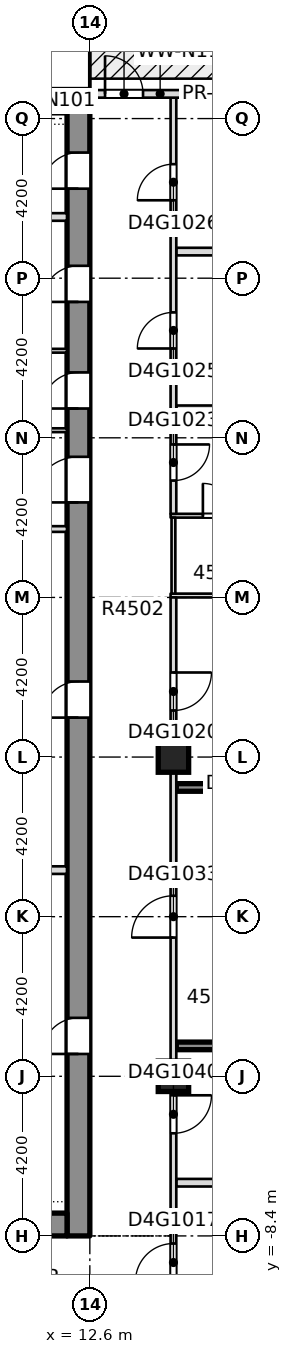
"""IFC4 building model, lengths in metres.
Left out: names, types, materials, properties, quantities, classifications, styles, units other than length and angle.
Written with IfcOpenShell. Run it as: python <this file> out.ifc"""

import sys

from ifc_helpers import new_model, si_unit, direction, frame, frame_2d, origin, origin_2d, place, context, subcontext, project, spatial, rectangle, extrude, element, fill, save


model = new_model("IFC4")
c1 = context("Model", 3, precision=1e-05, world=origin(), true_north=direction((0.0, 1.0)))
c2 = subcontext(c1, "Body", "Model", "MODEL_VIEW")
j1 = project(units=[si_unit("LENGTHUNIT", "METRE"), si_unit("PLANEANGLEUNIT", "RADIAN")], contexts=[c1])
p1 = place(None, origin())
s1 = spatial("IfcSite", under=j1, at=p1, CompositionType="ELEMENT")
p2 = place(p1, origin())
s2 = spatial("IfcBuilding", under=s1, at=p2, CompositionType="ELEMENT")
p3 = place(p2, frame((0.0, 0.0, 175.55)))
s3 = spatial("IfcBuildingStorey", under=s2, at=p3, CompositionType="ELEMENT", Elevation=175.55)
p4 = place(p3, frame((12.3, -8.4, -0.4), z_axis=(0.0, 0.0, 1.0), x_axis=(0.0, 1.0, 0.0)))
e1 = element("IfcWall", 1, at=p4, inside=s3, PredefinedType="SHEAR", context=c2, shape_type="SweptSolid", body=[
    extrude(rectangle(XDim=30.15, YDim=0.6, at=frame_2d((15.075, 0.0))), origin(), (0.0, 0.0, 1.0), 3.45),
])
p5 = place(p4, frame((4.788, 0.0, 0.4)))
e2 = element("IfcOpeningElement", 2, at=p5, cuts=e1, PredefinedType="OPENING", context=c2, shape_type="SweptSolid", body=[
    extrude(rectangle(XDim=0.95, YDim=2.1, at=frame_2d((0.475, 1.05))), frame((0.0, 0.31, 0.0), z_axis=(0.0, -1.0, 0.0), x_axis=(1.0, 0.0, 0.0)), (0.0, 0.0, 1.0), 0.62),
])
p6 = place(p4, frame((13.638, 0.0, 0.4)))
e3 = element("IfcOpeningElement", 3, at=p6, cuts=e1, PredefinedType="OPENING", context=c2, shape_type="SweptSolid", body=[
    extrude(rectangle(XDim=0.95, YDim=2.1, at=frame_2d((0.475, 1.05))), frame((0.0, 0.31, 0.0), z_axis=(0.0, -1.0, 0.0), x_axis=(1.0, 0.0, 0.0)), (0.0, 0.0, 1.0), 0.62),
])
p7 = place(p4, frame((21.771, 0.0, 0.4)))
e4 = element("IfcOpeningElement", 4, at=p7, cuts=e1, PredefinedType="OPENING", context=c2, shape_type="SweptSolid", body=[
    extrude(rectangle(XDim=0.95, YDim=2.1, at=frame_2d((0.475, 1.05))), frame((0.0, 0.31, 0.0), z_axis=(0.0, -1.0, 0.0), x_axis=(1.0, 0.0, 0.0)), (0.0, 0.0, 1.0), 0.62),
])
p8 = place(p4, frame((24.576, 0.0, 0.4)))
e5 = element("IfcOpeningElement", 5, at=p8, cuts=e1, PredefinedType="OPENING", context=c2, shape_type="SweptSolid", body=[
    extrude(rectangle(XDim=0.95, YDim=2.1, at=frame_2d((0.475, 1.05))), frame((0.0, 0.31, 0.0), z_axis=(0.0, -1.0, 0.0), x_axis=(1.0, 0.0, 0.0)), (0.0, 0.0, 1.0), 0.62),
])
p9 = place(p4, frame((27.555, 0.0, 0.4)))
e6 = element("IfcOpeningElement", 6, at=p9, cuts=e1, PredefinedType="OPENING", context=c2, shape_type="SweptSolid", body=[
    extrude(rectangle(XDim=0.95, YDim=2.1, at=frame_2d((0.475, 1.05))), frame((0.0, 0.31, 0.0), z_axis=(0.0, -1.0, 0.0), x_axis=(1.0, 0.0, 0.0)), (0.0, 0.0, 1.0), 0.62),
])
p10 = place(p4, frame((19.3, 0.0, 0.4)))
e7 = element("IfcOpeningElement", 7, at=p10, cuts=e1, PredefinedType="OPENING", context=c2, shape_type="SweptSolid", body=[
    extrude(rectangle(XDim=1.2, YDim=2.1, at=frame_2d((0.6, 1.05))), frame((0.0, 0.31, 0.0), z_axis=(0.0, -1.0, 0.0), x_axis=(1.0, 0.0, 0.0)), (0.0, 0.0, 1.0), 0.62),
])
p11 = place(p3, frame((-12.0, -8.1, -0.4), z_axis=(0.0, 0.0, 1.0), x_axis=(1.0, 0.0, 0.0)))
e8 = element("IfcWall", 8, at=p11, inside=s3, PredefinedType="SHEAR", context=c2, shape_type="SweptSolid", body=[
    extrude(rectangle(XDim=24.0, YDim=0.6, at=frame_2d((12.0, 0.0))), origin(), (0.0, 0.0, 1.0), 3.45),
])
p12 = place(p11, frame((7.25, 0.0, 0.4)))
e9 = element("IfcOpeningElement", 9, at=p12, cuts=e8, PredefinedType="OPENING", context=c2, shape_type="SweptSolid", body=[
    extrude(rectangle(XDim=1.8, YDim=2.1, at=frame_2d((0.9, 1.05))), frame((0.0, 0.31, 0.0), z_axis=(0.0, -1.0, 0.0), x_axis=(1.0, 0.0, 0.0)), (0.0, 0.0, 1.0), 0.62),
])
p13 = place(p11, frame((14.95, 0.0, 0.4)))
e10 = element("IfcOpeningElement", 10, at=p13, cuts=e8, PredefinedType="OPENING", context=c2, shape_type="SweptSolid", body=[
    extrude(rectangle(XDim=1.8, YDim=2.1, at=frame_2d((0.9, 1.05))), frame((0.0, 0.31, 0.0), z_axis=(0.0, -1.0, 0.0), x_axis=(1.0, 0.0, 0.0)), (0.0, 0.0, 1.0), 0.62),
])
p14 = place(p3, frame((-12.0, 21.45, -0.4), z_axis=(0.0, 0.0, 1.0), x_axis=(1.0, 0.0, 0.0)))
e11 = element("IfcWall", 11, at=p14, inside=s3, PredefinedType="SHEAR", context=c2, shape_type="SweptSolid", body=[
    extrude(rectangle(XDim=24.0, YDim=0.6, at=frame_2d((12.0, 0.0))), origin(), (0.0, 0.0, 1.0), 3.45),
])
for number, where, z_axis, x_axis in (
    (12, (14.8, -4.2, -0.4), (0.0, 0.0, 1.0), (1.0, 0.0, 0.0)),
    (13, (14.8, 4.2, -0.4), (0.0, 0.0, 1.0), (1.0, 0.0, 0.0)),
):
    element("IfcColumn", number, at=place(p3, frame(where, z_axis=z_axis, x_axis=x_axis)), inside=s3, PredefinedType="COLUMN", context=c2, shape_type="SweptSolid", body=[
        extrude(rectangle(XDim=0.8, YDim=0.8, at=origin_2d()), origin(), (0.0, 0.0, 1.0), 3.45),
    ])
p15 = place(p3, frame((14.875, -7.0, 0.0), z_axis=(0.0, 0.0, 1.0), x_axis=(1.0, 0.0, 0.0)))
e14 = element("IfcWall", 14, at=p15, inside=s3, PredefinedType="PARTITIONING", context=c2, shape_type="SweptSolid", body=[
    extrude(rectangle(XDim=10.875, YDim=0.2, at=frame_2d((5.438, 0.0))), origin(), (0.0, 0.0, 1.0), 3.05),
])
p16 = place(p3, frame((14.875, -3.4, 0.0), z_axis=(0.0, 0.0, 1.0), x_axis=(1.0, 0.0, 0.0)))
e15 = element("IfcWall", 15, at=p16, inside=s3, PredefinedType="SOLIDWALL", context=c2, shape_type="SweptSolid", body=[
    extrude(rectangle(XDim=7.525, YDim=0.2, at=frame_2d((3.762, 0.0))), origin(), (0.0, 0.0, 1.0), 3.05),
])
p17 = place(p3, frame((14.875, 3.4, 0.0), z_axis=(0.0, 0.0, 1.0), x_axis=(1.0, 0.0, 0.0)))
e16 = element("IfcWall", 16, at=p17, inside=s3, PredefinedType="SOLIDWALL", context=c2, shape_type="SweptSolid", body=[
    extrude(rectangle(XDim=5.575, YDim=0.2, at=frame_2d((2.788, 0.0))), origin(), (0.0, 0.0, 1.0), 3.05),
])
p18 = place(p3, frame((14.725, 8.45, 0.0), z_axis=(0.0, 0.0, 1.0), x_axis=(1.0, 0.0, 0.0)))
e17 = element("IfcWall", 17, at=p18, inside=s3, PredefinedType="PARTITIONING", context=c2, shape_type="SweptSolid", body=[
    extrude(rectangle(XDim=2.525, YDim=0.1, at=frame_2d((1.262, 0.0))), origin(), (0.0, 0.0, 1.0), 3.05),
])
p19 = place(p3, frame((14.725, 10.55, 0.0), z_axis=(0.0, 0.0, 1.0), x_axis=(1.0, 0.0, 0.0)))
e18 = element("IfcWall", 18, at=p19, inside=s3, PredefinedType="PARTITIONING", context=c2, shape_type="SweptSolid", body=[
    extrude(rectangle(XDim=2.525, YDim=0.1, at=frame_2d((1.262, 0.0))), origin(), (0.0, 0.0, 1.0), 3.05),
])
p20 = place(p19, frame((0.85, 0.0, 0.0)))
e19 = element("IfcOpeningElement", 19, at=p20, cuts=e18, PredefinedType="OPENING", context=c2, shape_type="SweptSolid", body=[
    extrude(rectangle(XDim=0.85, YDim=2.1, at=frame_2d((0.425, 1.05))), frame((0.0, 0.06, 0.0), z_axis=(0.0, -1.0, 0.0), x_axis=(1.0, 0.0, 0.0)), (0.0, 0.0, 1.0), 0.12),
])
for number, where, z_axis, x_axis in (
    (20, (14.875, 13.35, 0.0), (0.0, 0.0, 1.0), (1.0, 0.0, 0.0)),
    (21, (14.875, 17.5, 0.0), (0.0, 0.0, 1.0), (1.0, 0.0, 0.0)),
):
    element("IfcWall", number, at=place(p3, frame(where, z_axis=z_axis, x_axis=x_axis)), inside=s3, PredefinedType="PARTITIONING", context=c2, shape_type="SweptSolid", body=[
        extrude(rectangle(XDim=2.475, YDim=0.2, at=frame_2d((1.238, 0.0))), origin(), (0.0, 0.0, 1.0), 3.05),
    ])
p21 = place(p3, frame((14.8, -10.525, 0.0), z_axis=(0.0, 0.0, 1.0), x_axis=(0.0, 1.0, 0.0)))
e22 = element("IfcWall", 22, at=p21, inside=s3, PredefinedType="PARTITIONING", context=c2, shape_type="SweptSolid", body=[
    extrude(rectangle(XDim=18.925, YDim=0.15, at=frame_2d((9.462, 0.0))), origin(), (0.0, 0.0, 1.0), 3.05),
])
p22 = place(p21, frame((0.925, 0.0, 0.0)))
e23 = element("IfcOpeningElement", 23, at=p22, cuts=e22, PredefinedType="OPENING", context=c2, shape_type="SweptSolid", body=[
    extrude(rectangle(XDim=1.0, YDim=2.1, at=frame_2d((0.5, 1.05))), frame((0.0, 0.085, 0.0), z_axis=(0.0, -1.0, 0.0), x_axis=(1.0, 0.0, 0.0)), (0.0, 0.0, 1.0), 0.17),
])
p23 = place(p21, frame((15.95, 0.0, 0.0)))
e24 = element("IfcOpeningElement", 24, at=p23, cuts=e22, PredefinedType="OPENING", context=c2, shape_type="SweptSolid", body=[
    extrude(rectangle(XDim=1.0, YDim=2.1, at=frame_2d((0.5, 1.05))), frame((0.0, 0.085, 0.0), z_axis=(0.0, -1.0, 0.0), x_axis=(1.0, 0.0, 0.0)), (0.0, 0.0, 1.0), 0.17),
])
p24 = place(p21, frame((9.975, 0.0, 0.0)))
e25 = element("IfcOpeningElement", 25, at=p24, cuts=e22, PredefinedType="OPENING", context=c2, shape_type="SweptSolid", body=[
    extrude(rectangle(XDim=1.1, YDim=2.1, at=frame_2d((0.55, 1.05))), frame((0.0, 0.085, 0.0), z_axis=(0.0, -1.0, 0.0), x_axis=(1.0, 0.0, 0.0)), (0.0, 0.0, 1.0), 0.17),
])
p25 = place(p21, frame((4.825, 0.0, 0.0)))
e26 = element("IfcOpeningElement", 26, at=p25, cuts=e22, PredefinedType="OPENING", context=c2, shape_type="SweptSolid", body=[
    extrude(rectangle(XDim=1.0, YDim=2.1, at=frame_2d((0.5, 1.05))), frame((0.0, 0.085, 0.0), z_axis=(0.0, -1.0, 0.0), x_axis=(1.0, 0.0, 0.0)), (0.0, 0.0, 1.0), 0.17),
])
p26 = place(p3, frame((14.8, 8.5, 0.0), z_axis=(0.0, 0.0, 1.0), x_axis=(0.0, 1.0, 0.0)))
e27 = element("IfcWall", 27, at=p26, inside=s3, PredefinedType="PARTITIONING", context=c2, shape_type="SweptSolid", body=[
    extrude(rectangle(XDim=2.0, YDim=0.1, at=frame_2d((1.0, 0.0))), origin(), (0.0, 0.0, 1.0), 3.05),
])
p27 = place(p3, frame((14.8, 10.6, 0.0), z_axis=(0.0, 0.0, 1.0), x_axis=(0.0, 1.0, 0.0)))
e28 = element("IfcWall", 28, at=p27, inside=s3, PredefinedType="PARTITIONING", context=c2, shape_type="SweptSolid", body=[
    extrude(rectangle(XDim=10.95, YDim=0.15, at=frame_2d((5.475, 0.0))), origin(), (0.0, 0.0, 1.0), 3.05),
])
p28 = place(p27, frame((0.875, 0.0, 0.0)))
e29 = element("IfcOpeningElement", 29, at=p28, cuts=e28, PredefinedType="OPENING", context=c2, shape_type="SweptSolid", body=[
    extrude(rectangle(XDim=0.95, YDim=2.1, at=frame_2d((0.475, 1.05))), frame((0.0, 0.085, 0.0), z_axis=(0.0, -1.0, 0.0), x_axis=(1.0, 0.0, 0.0)), (0.0, 0.0, 1.0), 0.17),
])
p29 = place(p27, frame((4.35, 0.0, 0.0)))
e30 = element("IfcOpeningElement", 30, at=p29, cuts=e28, PredefinedType="OPENING", context=c2, shape_type="SweptSolid", body=[
    extrude(rectangle(XDim=0.95, YDim=2.1, at=frame_2d((0.475, 1.05))), frame((0.0, 0.085, 0.0), z_axis=(0.0, -1.0, 0.0), x_axis=(1.0, 0.0, 0.0)), (0.0, 0.0, 1.0), 0.17),
])
p30 = place(p27, frame((8.25, 0.0, 0.0)))
e31 = element("IfcOpeningElement", 31, at=p30, cuts=e28, PredefinedType="OPENING", context=c2, shape_type="SweptSolid", body=[
    extrude(rectangle(XDim=0.95, YDim=2.1, at=frame_2d((0.475, 1.05))), frame((0.0, 0.085, 0.0), z_axis=(0.0, -1.0, 0.0), x_axis=(1.0, 0.0, 0.0)), (0.0, 0.0, 1.0), 0.17),
])
p31 = place(p3, frame((16.3, 21.65, 0.0), z_axis=(0.0, 0.0, 1.0), x_axis=(-1.0, 0.0, 0.0)))
e32 = element("IfcWall", 32, at=p31, inside=s3, PredefinedType="STANDARD", context=c2, shape_type="SweptSolid", body=[
    extrude(rectangle(XDim=3.7, YDim=0.2, at=frame_2d((1.85, 0.0))), origin(), (0.0, 0.0, 1.0), 3.05),
])
p32 = place(p31, frame((2.3, 0.0, 0.0)))
e33 = element("IfcOpeningElement", 33, at=p32, cuts=e32, PredefinedType="OPENING", context=c2, shape_type="SweptSolid", body=[
    extrude(rectangle(XDim=1.0, YDim=2.4, at=frame_2d((0.5, 1.2))), frame((0.0, 0.11, 0.0), z_axis=(0.0, -1.0, 0.0), x_axis=(1.0, 0.0, 0.0)), (0.0, 0.0, 1.0), 0.22),
])
p33 = place(p3, frame((17.49, 22.954, -0.04), z_axis=(0.0, 0.0, 1.0), x_axis=(-1.0, 0.0, 0.0)))
e34 = element("IfcWall", 34, at=p33, inside=s3, PredefinedType="USERDEFINED", context=c2, shape_type="SweptSolid", body=[
    extrude(rectangle(XDim=2.89, YDim=0.6, at=frame_2d((1.445, 0.0))), origin(), (0.0, 0.0, 1.0), 1.2),
])
p34 = place(p3, frame((8.701, 1.225, 0.0), z_axis=(0.0, 0.0, 1.0), x_axis=(1.0, 0.0, 0.0)))
e35 = element("IfcWall", 35, at=p34, inside=s3, PredefinedType="PARTITIONING", context=c2, shape_type="SweptSolid", body=[
    extrude(rectangle(XDim=3.298, YDim=0.2, at=frame_2d((1.649, 0.0))), origin(), (0.0, 0.0, 1.0), 3.05),
])
p35 = place(p3, frame((8.701, 10.2, 0.0), z_axis=(0.0, 0.0, 1.0), x_axis=(1.0, 0.0, 0.0)))
e36 = element("IfcWall", 36, at=p35, inside=s3, PredefinedType="PARTITIONING", context=c2, shape_type="SweptSolid", body=[
    extrude(rectangle(XDim=3.298, YDim=0.15, at=frame_2d((1.649, 0.0))), origin(), (0.0, 0.0, 1.0), 3.05),
])
for number, where, z_axis, x_axis in (
    (37, (8.701, 12.8, 0.0), (0.0, 0.0, 1.0), (1.0, 0.0, 0.0)),
    (38, (8.701, 14.891, 0.0), (0.0, 0.0, 1.0), (1.0, 0.0, 0.0)),
):
    element("IfcWall", number, at=place(p3, frame(where, z_axis=z_axis, x_axis=x_axis)), inside=s3, PredefinedType="PARTITIONING", context=c2, shape_type="SweptSolid", body=[
        extrude(rectangle(XDim=3.298, YDim=0.1, at=frame_2d((1.649, 0.0))), origin(), (0.0, 0.0, 1.0), 3.05),
    ])
p36 = place(p3, frame((8.701, 18.411, 0.0), z_axis=(0.0, 0.0, 1.0), x_axis=(1.0, 0.0, 0.0)))
e39 = element("IfcWall", 39, at=p36, inside=s3, PredefinedType="PARTITIONING", context=c2, shape_type="SweptSolid", body=[
    extrude(rectangle(XDim=3.298, YDim=0.2, at=frame_2d((1.649, 0.0))), origin(), (0.0, 0.0, 1.0), 3.05),
])
p37 = place(p22, origin())
e40 = element("IfcDoor", 40, at=p37, inside=s3, OperationType="SINGLE_SWING_RIGHT", PredefinedType="DOOR", context=c2, shape_type="SweptSolid", body=[
    extrude(rectangle(XDim=1.0, YDim=2.1, at=frame_2d((0.5, 1.05))), frame((0.0, 0.025, 0.0), z_axis=(0.0, -1.0, 0.0), x_axis=(1.0, 0.0, 0.0)), (0.0, 0.0, 1.0), 0.05),
])
fill(e23, e40)
p38 = place(p23, origin())
e41 = element("IfcDoor", 41, at=p38, inside=s3, OperationType="SINGLE_SWING_LEFT", PredefinedType="DOOR", context=c2, shape_type="SweptSolid", body=[
    extrude(rectangle(XDim=1.0, YDim=2.1, at=frame_2d((0.5, 1.05))), frame((0.0, 0.025, 0.0), z_axis=(0.0, -1.0, 0.0), x_axis=(1.0, 0.0, 0.0)), (0.0, 0.0, 1.0), 0.05),
])
fill(e24, e41)
p39 = place(p28, origin())
e42 = element("IfcDoor", 42, at=p39, inside=s3, OperationType="SINGLE_SWING_RIGHT", PredefinedType="DOOR", context=c2, shape_type="SweptSolid", body=[
    extrude(rectangle(XDim=0.95, YDim=2.1, at=frame_2d((0.475, 1.05))), frame((0.0, 0.025, 0.0), z_axis=(0.0, -1.0, 0.0), x_axis=(1.0, 0.0, 0.0)), (0.0, 0.0, 1.0), 0.05),
])
fill(e29, e42)
p40 = place(p20, origin())
e43 = element("IfcDoor", 43, at=p40, inside=s3, OperationType="SINGLE_SWING_RIGHT", PredefinedType="DOOR", context=c2, shape_type="SweptSolid", body=[
    extrude(rectangle(XDim=0.85, YDim=2.1, at=frame_2d((0.425, 1.05))), frame((0.0, 0.025, 0.0), z_axis=(0.0, -1.0, 0.0), x_axis=(1.0, 0.0, 0.0)), (0.0, 0.0, 1.0), 0.05),
])
fill(e19, e43)
p41 = place(p29, origin())
e44 = element("IfcDoor", 44, at=p41, inside=s3, OperationType="SINGLE_SWING_RIGHT", PredefinedType="DOOR", context=c2, shape_type="SweptSolid", body=[
    extrude(rectangle(XDim=0.95, YDim=2.1, at=frame_2d((0.475, 1.05))), frame((0.0, 0.025, 0.0), z_axis=(0.0, -1.0, 0.0), x_axis=(1.0, 0.0, 0.0)), (0.0, 0.0, 1.0), 0.05),
])
fill(e30, e44)
p42 = place(p30, origin())
e45 = element("IfcDoor", 45, at=p42, inside=s3, OperationType="SINGLE_SWING_LEFT", PredefinedType="DOOR", context=c2, shape_type="SweptSolid", body=[
    extrude(rectangle(XDim=0.95, YDim=2.1, at=frame_2d((0.475, 1.05))), frame((0.0, 0.025, 0.0), z_axis=(0.0, -1.0, 0.0), x_axis=(1.0, 0.0, 0.0)), (0.0, 0.0, 1.0), 0.05),
])
fill(e31, e45)
p43 = place(p24, origin())
e46 = element("IfcDoor", 46, at=p43, inside=s3, OperationType="SINGLE_SWING_LEFT", PredefinedType="DOOR", context=c2, shape_type="SweptSolid", body=[
    extrude(rectangle(XDim=1.1, YDim=2.1, at=frame_2d((0.55, 1.05))), frame((0.0, 0.025, 0.0), z_axis=(0.0, -1.0, 0.0), x_axis=(1.0, 0.0, 0.0)), (0.0, 0.0, 1.0), 0.05),
])
fill(e25, e46)
p44 = place(p25, origin())
e47 = element("IfcDoor", 47, at=p44, inside=s3, OperationType="SINGLE_SWING_LEFT", PredefinedType="DOOR", context=c2, shape_type="SweptSolid", body=[
    extrude(rectangle(XDim=1.0, YDim=2.1, at=frame_2d((0.5, 1.05))), frame((0.0, 0.025, 0.0), z_axis=(0.0, -1.0, 0.0), x_axis=(1.0, 0.0, 0.0)), (0.0, 0.0, 1.0), 0.05),
])
fill(e26, e47)
p45 = place(p32, origin())
e48 = element("IfcDoor", 48, at=p45, inside=s3, OperationType="SINGLE_SWING_LEFT", PredefinedType="DOOR", context=c2, shape_type="SweptSolid", body=[
    extrude(rectangle(XDim=1.0, YDim=2.4, at=frame_2d((0.5, 1.2))), frame((0.0, 0.025, 0.0), z_axis=(0.0, -1.0, 0.0), x_axis=(1.0, 0.0, 0.0)), (0.0, 0.0, 1.0), 0.05),
])
fill(e33, e48)
p46 = place(p5, origin())
e49 = element("IfcDoor", 49, at=p46, inside=s3, OperationType="SINGLE_SWING_LEFT", PredefinedType="DOOR", context=c2, shape_type="SweptSolid", body=[
    extrude(rectangle(XDim=0.95, YDim=2.1, at=frame_2d((0.475, 1.05))), frame((0.0, 0.025, 0.0), z_axis=(0.0, -1.0, 0.0), x_axis=(1.0, 0.0, 0.0)), (0.0, 0.0, 1.0), 0.05),
])
fill(e2, e49)
p47 = place(p6, origin())
e50 = element("IfcDoor", 50, at=p47, inside=s3, OperationType="SINGLE_SWING_LEFT", PredefinedType="DOOR", context=c2, shape_type="SweptSolid", body=[
    extrude(rectangle(XDim=0.95, YDim=2.1, at=frame_2d((0.475, 1.05))), frame((0.0, 0.025, 0.0), z_axis=(0.0, -1.0, 0.0), x_axis=(1.0, 0.0, 0.0)), (0.0, 0.0, 1.0), 0.05),
])
fill(e3, e50)
p48 = place(p7, origin())
e51 = element("IfcDoor", 51, at=p48, inside=s3, OperationType="SINGLE_SWING_LEFT", PredefinedType="DOOR", context=c2, shape_type="SweptSolid", body=[
    extrude(rectangle(XDim=0.95, YDim=2.1, at=frame_2d((0.475, 1.05))), frame((0.0, 0.025, 0.0), z_axis=(0.0, -1.0, 0.0), x_axis=(1.0, 0.0, 0.0)), (0.0, 0.0, 1.0), 0.05),
])
fill(e4, e51)
p49 = place(p8, origin())
e52 = element("IfcDoor", 52, at=p49, inside=s3, OperationType="SINGLE_SWING_LEFT", PredefinedType="DOOR", context=c2, shape_type="SweptSolid", body=[
    extrude(rectangle(XDim=0.95, YDim=2.1, at=frame_2d((0.475, 1.05))), frame((0.0, 0.025, 0.0), z_axis=(0.0, -1.0, 0.0), x_axis=(1.0, 0.0, 0.0)), (0.0, 0.0, 1.0), 0.05),
])
fill(e5, e52)
p50 = place(p9, origin())
e53 = element("IfcDoor", 53, at=p50, inside=s3, OperationType="SINGLE_SWING_LEFT", PredefinedType="DOOR", context=c2, shape_type="SweptSolid", body=[
    extrude(rectangle(XDim=0.95, YDim=2.1, at=frame_2d((0.475, 1.05))), frame((0.0, 0.025, 0.0), z_axis=(0.0, -1.0, 0.0), x_axis=(1.0, 0.0, 0.0)), (0.0, 0.0, 1.0), 0.05),
])
fill(e6, e53)
p51 = place(p10, origin())
e54 = element("IfcDoor", 54, at=p51, inside=s3, OperationType="SINGLE_SWING_LEFT", PredefinedType="DOOR", context=c2, shape_type="SweptSolid", body=[
    extrude(rectangle(XDim=1.2, YDim=2.1, at=frame_2d((0.6, 1.05))), frame((0.0, 0.025, 0.0), z_axis=(0.0, -1.0, 0.0), x_axis=(1.0, 0.0, 0.0)), (0.0, 0.0, 1.0), 0.05),
])
fill(e7, e54)
save(model, sys.argv[1])
